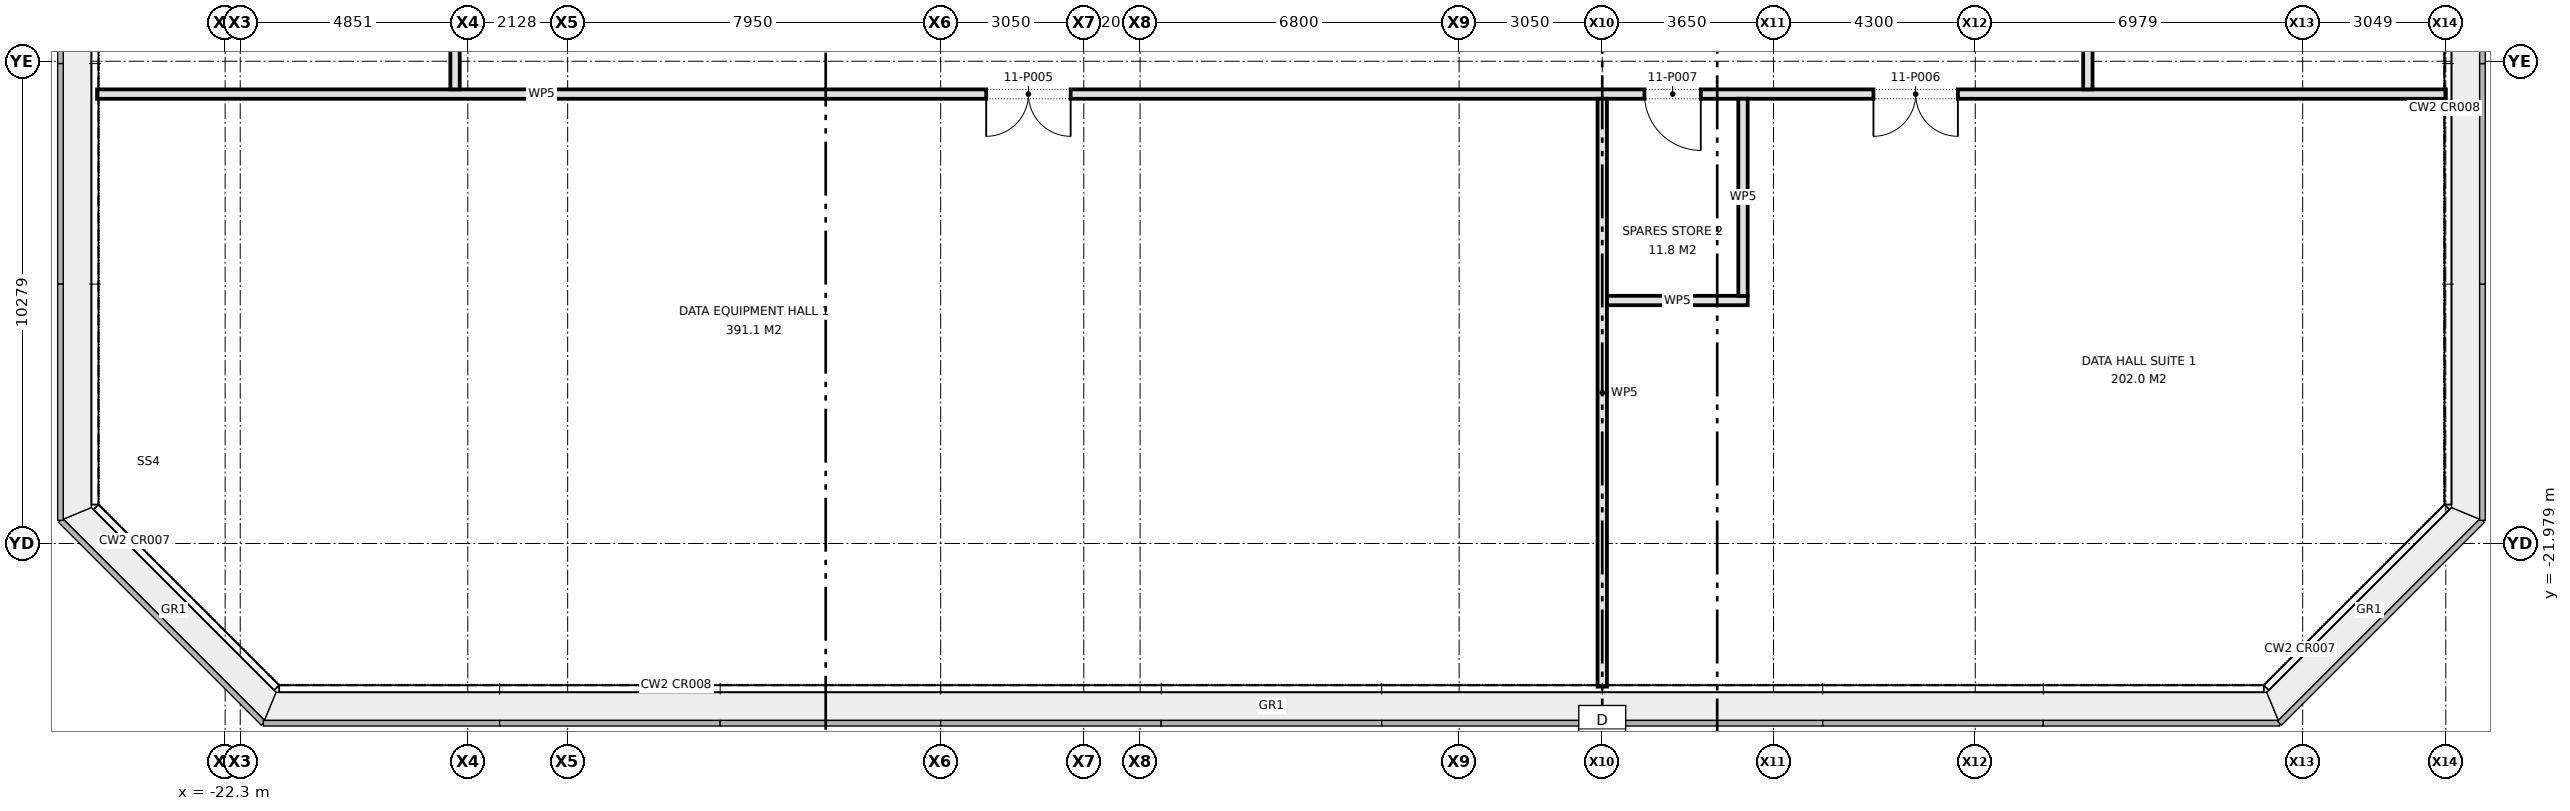
"""IFC4 building model, lengths in metres.
Left out: names, types, materials, properties, quantities, classifications, styles, units other than length and angle.
Written with IfcOpenShell. Run it as: python <this file> out.ifc"""

import sys

from ifc_helpers import new_model, si_unit, direction, frame, frame_2d, origin, place, context, subcontext, project, spatial, rectangle, extrude, element, fill, save


model = new_model("IFC4")
c1 = context("Model", 3, precision=1e-05, world=origin(), true_north=direction((0.0, 1.0)))
c2 = subcontext(c1, "Body", "Model", "MODEL_VIEW")
j1 = project(units=[si_unit("LENGTHUNIT", "METRE"), si_unit("PLANEANGLEUNIT", "RADIAN")], contexts=[c1])
p1 = place(None, origin())
s1 = spatial("IfcSite", under=j1, at=p1, CompositionType="ELEMENT")
p2 = place(p1, origin())
s2 = spatial("IfcBuilding", under=s1, at=p2, CompositionType="ELEMENT")
p3 = place(p2, frame((0.0, 0.0, 49.7)))
s3 = spatial("IfcBuildingStorey", under=s2, at=p3, CompositionType="ELEMENT", Elevation=49.7)
p4 = place(p3, frame((7.15, -16.8, 0.0), z_axis=(0.0, 0.0, 1.0), x_axis=(1.0, 0.0, 0.0)))
e1 = element("IfcWall", 1, at=p4, inside=s3, PredefinedType="PARTITIONING", context=c2, shape_type="SweptSolid", body=[
    extrude(rectangle(XDim=3.0, YDim=0.2, at=frame_2d((1.5, 0.0))), origin(), (0.0, 0.0, 1.0), 4.575),
])
p5 = place(p3, frame((-25.03, -12.4, 0.0), z_axis=(0.0, 0.0, 1.0), x_axis=(1.0, 0.0, 0.0)))
e2 = element("IfcWall", 2, at=p5, inside=s3, PredefinedType="PARTITIONING", context=c2, shape_type="SweptSolid", body=[
    extrude(rectangle(XDim=50.06, YDim=0.2, at=frame_2d((25.03, 0.0))), origin(), (0.0, 0.0, 1.0), 4.575),
])
p6 = place(p5, frame((18.95, 0.0, 0.0)))
e3 = element("IfcOpeningElement", 3, at=p6, cuts=e2, PredefinedType="OPENING", context=c2, shape_type="SweptSolid", body=[
    extrude(rectangle(XDim=1.8, YDim=2.1, at=frame_2d((0.9, 1.05))), frame((0.0, 0.11, 0.0), z_axis=(0.0, -1.0, 0.0), x_axis=(1.0, 0.0, 0.0)), (0.0, 0.0, 1.0), 0.22),
])
p7 = place(p5, frame((37.86, 0.0, 0.0)))
e4 = element("IfcOpeningElement", 4, at=p7, cuts=e2, PredefinedType="OPENING", context=c2, shape_type="SweptSolid", body=[
    extrude(rectangle(XDim=1.8, YDim=2.1, at=frame_2d((0.9, 1.05))), frame((0.0, 0.11, 0.0), z_axis=(0.0, -1.0, 0.0), x_axis=(1.0, 0.0, 0.0)), (0.0, 0.0, 1.0), 0.22),
])
p8 = place(p5, frame((32.98, 0.0, 0.0)))
e5 = element("IfcOpeningElement", 5, at=p8, cuts=e2, PredefinedType="OPENING", context=c2, shape_type="SweptSolid", body=[
    extrude(rectangle(XDim=1.2, YDim=2.1, at=frame_2d((0.6, 1.05))), frame((0.0, 0.11, 0.0), z_axis=(0.0, -1.0, 0.0), x_axis=(1.0, 0.0, 0.0)), (0.0, 0.0, 1.0), 0.22),
])
p9 = place(p3, frame((17.4, -12.3, 0.0), z_axis=(0.0, 0.0, 1.0), x_axis=(0.0, 1.0, 0.0)))
e6 = element("IfcWall", 6, at=p9, inside=s3, PredefinedType="PARTITIONING", context=c2, shape_type="SweptSolid", body=[
    extrude(rectangle(XDim=24.6, YDim=0.2, at=frame_2d((12.3, 0.0))), origin(), (0.0, 0.0, 1.0), 4.575),
])
p10 = place(p9, frame((4.025, 0.0, 0.0)))
e7 = element("IfcOpeningElement", 7, at=p10, cuts=e6, PredefinedType="OPENING", context=c2, shape_type="SweptSolid", body=[
    extrude(rectangle(XDim=1.8, YDim=2.1, at=frame_2d((0.9, 1.05))), frame((0.0, 0.11, 0.0), z_axis=(0.0, -1.0, 0.0), x_axis=(1.0, 0.0, 0.0)), (0.0, 0.0, 1.0), 0.22),
])
p11 = place(p9, frame((14.05, 0.0, 0.0)))
e8 = element("IfcOpeningElement", 8, at=p11, cuts=e6, PredefinedType="OPENING", context=c2, shape_type="SweptSolid", body=[
    extrude(rectangle(XDim=1.2, YDim=2.1, at=frame_2d((0.6, 1.05))), frame((0.0, 0.11, 0.0), z_axis=(0.0, -1.0, 0.0), x_axis=(1.0, 0.0, 0.0)), (0.0, 0.0, 1.0), 0.22),
])
p12 = place(p9, frame((21.125, 0.0, 0.0)))
e9 = element("IfcOpeningElement", 9, at=p12, cuts=e6, PredefinedType="OPENING", context=c2, shape_type="SweptSolid", body=[
    extrude(rectangle(XDim=1.8, YDim=2.1, at=frame_2d((0.9, 1.05))), frame((0.0, 0.11, 0.0), z_axis=(0.0, -1.0, 0.0), x_axis=(1.0, 0.0, 0.0)), (0.0, 0.0, 1.0), 0.22),
])
p13 = place(p3, frame((10.05, -16.7, 0.0), z_axis=(0.0, 0.0, 1.0), x_axis=(0.0, 1.0, 0.0)))
e10 = element("IfcWall", 10, at=p13, inside=s3, PredefinedType="PARTITIONING", context=c2, shape_type="SweptSolid", body=[
    extrude(rectangle(XDim=4.2, YDim=0.2, at=frame_2d((2.1, 0.0))), origin(), (0.0, 0.0, 1.0), 4.575),
])
p14 = place(p3, frame((7.05, -25.03, 0.0), z_axis=(0.0, 0.0, 1.0), x_axis=(0.0, 1.0, 0.0)))
e11 = element("IfcWall", 11, at=p14, inside=s3, PredefinedType="PARTITIONING", context=c2, shape_type="SweptSolid", body=[
    extrude(rectangle(XDim=12.53, YDim=0.2, at=frame_2d((6.265, 0.0))), origin(), (0.0, 0.0, 1.0), 4.575),
])
p15 = place(p3, frame((-17.4, -12.3, 0.0), z_axis=(0.0, 0.0, 1.0), x_axis=(0.0, 1.0, 0.0)))
e12 = element("IfcWall", 12, at=p15, inside=s3, PredefinedType="PARTITIONING", context=c2, shape_type="SweptSolid", body=[
    extrude(rectangle(XDim=28.2, YDim=0.2, at=frame_2d((14.1, 0.0))), origin(), (0.0, 0.0, 1.0), 4.575),
])
p16 = place(p15, frame((4.025, 0.0, 0.0)))
e13 = element("IfcOpeningElement", 13, at=p16, cuts=e12, PredefinedType="OPENING", context=c2, shape_type="SweptSolid", body=[
    extrude(rectangle(XDim=1.8, YDim=2.1, at=frame_2d((0.9, 1.05))), frame((0.0, 0.11, 0.0), z_axis=(0.0, -1.0, 0.0), x_axis=(1.0, 0.0, 0.0)), (0.0, 0.0, 1.0), 0.22),
])
p17 = place(p15, frame((20.525, 0.0, 0.0)))
e14 = element("IfcOpeningElement", 14, at=p17, cuts=e12, PredefinedType="OPENING", context=c2, shape_type="SweptSolid", body=[
    extrude(rectangle(XDim=1.8, YDim=2.1, at=frame_2d((0.9, 1.05))), frame((0.0, 0.11, 0.0), z_axis=(0.0, -1.0, 0.0), x_axis=(1.0, 0.0, 0.0)), (0.0, 0.0, 1.0), 0.22),
])
p18 = place(p15, frame((10.95, 0.0, 0.0)))
e15 = element("IfcOpeningElement", 15, at=p18, cuts=e12, PredefinedType="OPENING", context=c2, shape_type="SweptSolid", body=[
    extrude(rectangle(XDim=1.0, YDim=2.1, at=frame_2d((0.5, 1.05))), frame((0.0, 0.11, 0.0), z_axis=(0.0, -1.0, 0.0), x_axis=(1.0, 0.0, 0.0)), (0.0, 0.0, 1.0), 0.22),
])
p19 = place(p15, frame((13.95, 0.0, 0.0)))
e16 = element("IfcOpeningElement", 16, at=p19, cuts=e12, PredefinedType="OPENING", context=c2, shape_type="SweptSolid", body=[
    extrude(rectangle(XDim=1.0, YDim=2.1, at=frame_2d((0.5, 1.05))), frame((0.0, 0.11, 0.0), z_axis=(0.0, -1.0, 0.0), x_axis=(1.0, 0.0, 0.0)), (0.0, 0.0, 1.0), 0.22),
])
p20 = place(p15, frame((16.55, 0.0, 0.0)))
e17 = element("IfcOpeningElement", 17, at=p20, cuts=e12, PredefinedType="OPENING", context=c2, shape_type="SweptSolid", body=[
    extrude(rectangle(XDim=1.0, YDim=2.1, at=frame_2d((0.5, 1.05))), frame((0.0, 0.11, 0.0), z_axis=(0.0, -1.0, 0.0), x_axis=(1.0, 0.0, 0.0)), (0.0, 0.0, 1.0), 0.22),
])
p21 = place(p6, frame((1.8, 0.0, 0.0), z_axis=(0.0, 0.0, 1.0), x_axis=(-1.0, 0.0, 0.0)))
e18 = element("IfcDoor", 18, at=p21, inside=s3, OperationType="DOUBLE_DOOR_SINGLE_SWING", PredefinedType="DOOR", context=c2, shape_type="SweptSolid", body=[
    extrude(rectangle(XDim=1.8, YDim=2.1, at=frame_2d((0.9, 1.05))), frame((0.0, 0.025, 0.0), z_axis=(0.0, -1.0, 0.0), x_axis=(1.0, 0.0, 0.0)), (0.0, 0.0, 1.0), 0.05),
])
fill(e3, e18)
p22 = place(p7, frame((1.8, 0.0, 0.0), z_axis=(0.0, 0.0, 1.0), x_axis=(-1.0, 0.0, 0.0)))
e19 = element("IfcDoor", 19, at=p22, inside=s3, OperationType="DOUBLE_DOOR_SINGLE_SWING", PredefinedType="DOOR", context=c2, shape_type="SweptSolid", body=[
    extrude(rectangle(XDim=1.8, YDim=2.1, at=frame_2d((0.9, 1.05))), frame((0.0, 0.025, 0.0), z_axis=(0.0, -1.0, 0.0), x_axis=(1.0, 0.0, 0.0)), (0.0, 0.0, 1.0), 0.05),
])
fill(e4, e19)
p23 = place(p8, frame((1.2, 0.0, 0.0), z_axis=(0.0, 0.0, 1.0), x_axis=(-1.0, 0.0, 0.0)))
e20 = element("IfcDoor", 20, at=p23, inside=s3, OperationType="SINGLE_SWING_LEFT", PredefinedType="DOOR", context=c2, shape_type="SweptSolid", body=[
    extrude(rectangle(XDim=1.2, YDim=2.1, at=frame_2d((0.6, 1.05))), frame((0.0, 0.025, 0.0), z_axis=(0.0, -1.0, 0.0), x_axis=(1.0, 0.0, 0.0)), (0.0, 0.0, 1.0), 0.05),
])
fill(e5, e20)
save(model, sys.argv[1])
